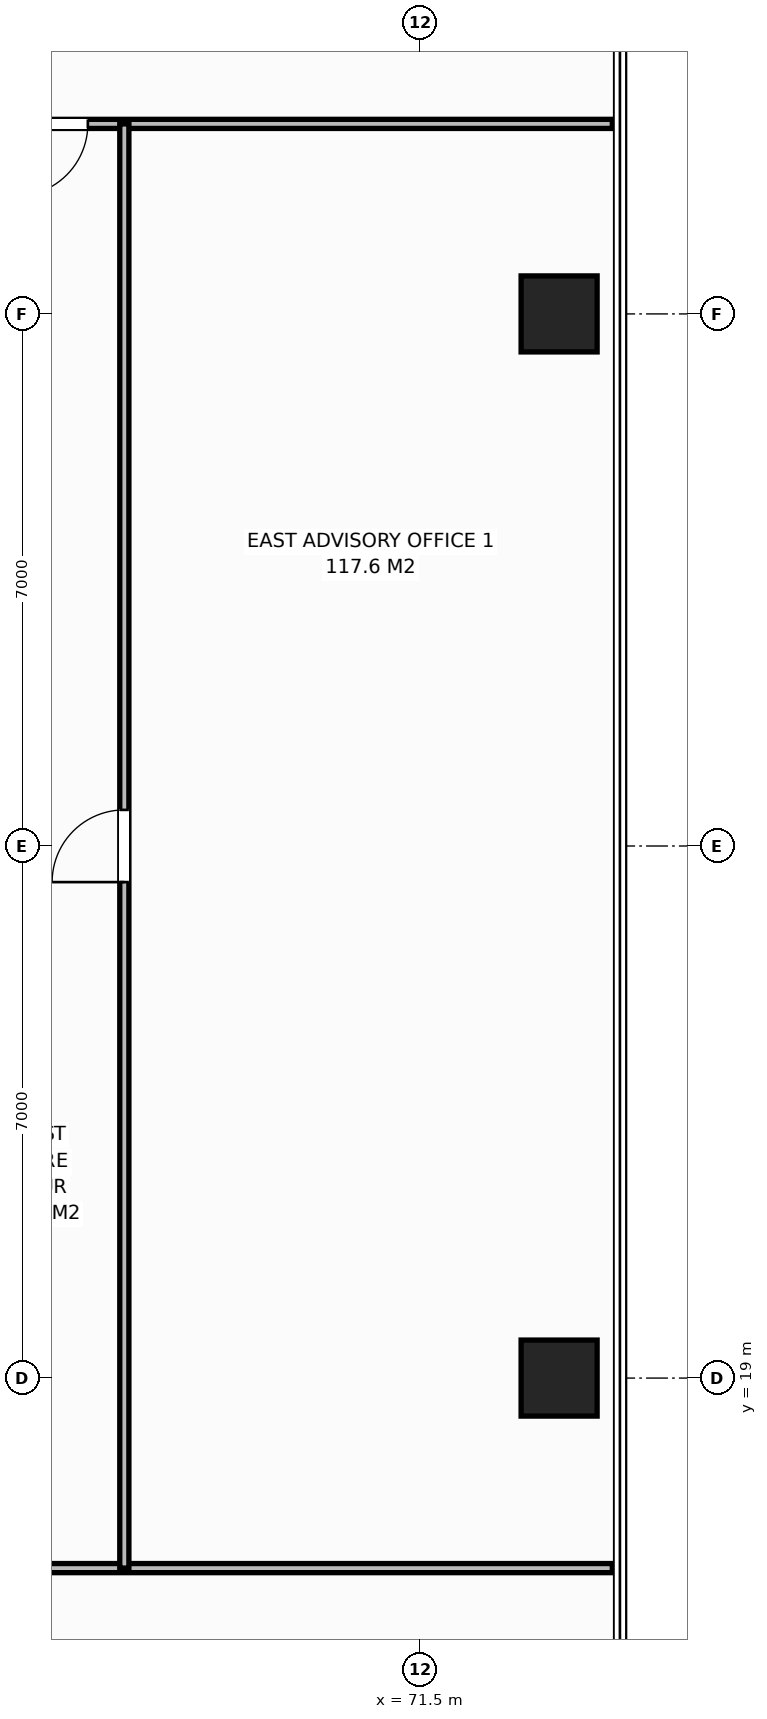
"""IFC4 building model, lengths in metres.
Left out: names, types, materials, properties, quantities, classifications, styles, units other than length and angle.
Written with IfcOpenShell. Run it as: python <this file> out.ifc"""

import sys

from ifc_helpers import new_model, si_unit, direction, frame, frame_2d, origin, origin_2d, place, context, subcontext, project, spatial, rectangle, extrude, element, fill, save


model = new_model("IFC4")
c1 = context("Model", 3, precision=1e-05, world=origin(), true_north=direction((0.0, 1.0)))
c2 = subcontext(c1, "Body", "Model", "MODEL_VIEW")
j1 = project(units=[si_unit("LENGTHUNIT", "METRE"), si_unit("PLANEANGLEUNIT", "RADIAN")], contexts=[c1])
p1 = place(None, origin())
s1 = spatial("IfcSite", under=j1, at=p1, CompositionType="ELEMENT")
p2 = place(p1, origin())
s2 = spatial("IfcBuilding", under=s1, at=p2, CompositionType="ELEMENT")
p3 = place(p2, frame((0.0, 0.0, 159.4)))
s3 = spatial("IfcBuildingStorey", under=s2, at=p3, CompositionType="ELEMENT", Elevation=159.4)
for number, where, z_axis, x_axis in (
    (1, (73.32, 19.0, 0.0), (0.0, 0.0, 1.0), (1.0, 0.0, 0.0)),
    (2, (73.32, 33.0, 0.0), (0.0, 0.0, 1.0), (1.0, 0.0, 0.0)),
):
    element("IfcColumn", number, at=place(p3, frame(where, z_axis=z_axis, x_axis=x_axis)), inside=s3, PredefinedType="COLUMN", context=c2, shape_type="SweptSolid", body=[
        extrude(rectangle(XDim=1.0, YDim=1.0, at=origin_2d()), origin(), (0.0, 0.0, 1.0), 3.8),
    ])
p4 = place(p3, frame((63.483, 35.5, 0.0), z_axis=(0.0, 0.0, 1.0), x_axis=(1.0, 0.0, 0.0)))
e3 = element("IfcWall", 3, at=p4, inside=s3, PredefinedType="PARTITIONING", context=c2, shape_type="SweptSolid", body=[
    extrude(rectangle(XDim=10.537, YDim=0.12, at=frame_2d((5.269, 0.0))), origin(), (0.0, 0.0, 1.0), 3.572),
])
p5 = place(p4, frame((2.687, 0.0, 0.0)))
e4 = element("IfcOpeningElement", 4, at=p5, cuts=e3, PredefinedType="OPENING", context=c2, shape_type="SweptSolid", body=[
    extrude(rectangle(XDim=0.95, YDim=2.15, at=frame_2d((0.475, 1.075))), frame((0.0, 0.07, 0.0), z_axis=(0.0, -1.0, 0.0), x_axis=(1.0, 0.0, 0.0)), (0.0, 0.0, 1.0), 0.14),
])
p6 = place(p3, frame((59.968, 16.5, 0.0), z_axis=(0.0, 0.0, 1.0), x_axis=(1.0, 0.0, 0.0)))
e5 = element("IfcWall", 5, at=p6, inside=s3, PredefinedType="PARTITIONING", context=c2, shape_type="SweptSolid", body=[
    extrude(rectangle(XDim=14.052, YDim=0.12, at=frame_2d((7.026, 0.0))), origin(), (0.0, 0.0, 1.0), 3.572),
])
p7 = place(p6, frame((0.48, 0.0, 0.0)))
e6 = element("IfcOpeningElement", 6, at=p7, cuts=e5, PredefinedType="OPENING", context=c2, shape_type="SweptSolid", body=[
    extrude(rectangle(XDim=0.95, YDim=2.15, at=frame_2d((0.475, 1.075))), frame((0.0, 0.07, 0.0), z_axis=(0.0, -1.0, 0.0), x_axis=(1.0, 0.0, 0.0)), (0.0, 0.0, 1.0), 0.14),
])
p8 = place(p3, frame((67.6, 16.5, 0.0), z_axis=(0.0, 0.0, 1.0), x_axis=(0.0, 1.0, 0.0)))
e7 = element("IfcWall", 7, at=p8, inside=s3, PredefinedType="PARTITIONING", context=c2, shape_type="SweptSolid", body=[
    extrude(rectangle(XDim=19.0, YDim=0.12, at=frame_2d((9.5, 0.0))), origin(), (0.0, 0.0, 1.0), 3.572),
])
p9 = place(p8, frame((9.025, 0.0, 0.0)))
e8 = element("IfcOpeningElement", 8, at=p9, cuts=e7, PredefinedType="OPENING", context=c2, shape_type="SweptSolid", body=[
    extrude(rectangle(XDim=0.95, YDim=2.15, at=frame_2d((0.475, 1.075))), frame((0.0, 0.07, 0.0), z_axis=(0.0, -1.0, 0.0), x_axis=(1.0, 0.0, 0.0)), (0.0, 0.0, 1.0), 0.14),
])
p10 = place(p5, origin())
e9 = element("IfcDoor", 9, at=p10, inside=s3, OperationType="SINGLE_SWING_RIGHT", PredefinedType="DOOR", context=c2, shape_type="SweptSolid", body=[
    extrude(rectangle(XDim=0.95, YDim=2.15, at=frame_2d((0.475, 1.075))), frame((0.0, 0.025, 0.0), z_axis=(0.0, -1.0, 0.0), x_axis=(1.0, 0.0, 0.0)), (0.0, 0.0, 1.0), 0.05),
])
fill(e4, e9)
p11 = place(p9, origin())
e10 = element("IfcDoor", 10, at=p11, inside=s3, OperationType="SINGLE_SWING_LEFT", PredefinedType="DOOR", context=c2, shape_type="SweptSolid", body=[
    extrude(rectangle(XDim=0.95, YDim=2.15, at=frame_2d((0.475, 1.075))), frame((0.0, 0.025, 0.0), z_axis=(0.0, -1.0, 0.0), x_axis=(1.0, 0.0, 0.0)), (0.0, 0.0, 1.0), 0.05),
])
fill(e8, e10)
save(model, sys.argv[1])
